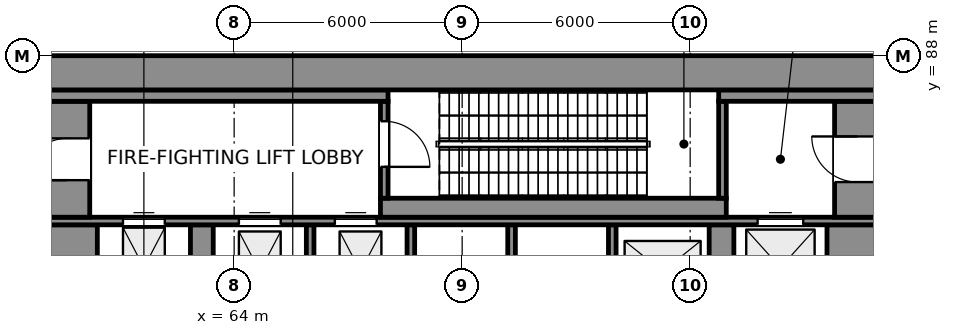
"""IFC4 building model, lengths in metres.
Left out: names, types, materials, properties, quantities, classifications, styles, units other than length and angle.
Written with IfcOpenShell. Run it as: python <this file> out.ifc"""

import sys

from ifc_helpers import new_model, si_unit, direction, frame, frame_2d, origin, place, context, subcontext, project, spatial, rectangle, extrude, element, fill, save


model = new_model("IFC4")
c1 = context("Model", 3, precision=1e-05, world=origin(), true_north=direction((0.0, 1.0)))
c2 = subcontext(c1, "Body", "Model", "MODEL_VIEW")
j1 = project(units=[si_unit("LENGTHUNIT", "METRE"), si_unit("PLANEANGLEUNIT", "RADIAN")], contexts=[c1])
p1 = place(None, origin())
s1 = spatial("IfcSite", under=j1, at=p1, CompositionType="ELEMENT")
p2 = place(p1, origin())
s2 = spatial("IfcBuilding", under=s1, at=p2, CompositionType="ELEMENT")
p3 = place(p2, frame((0.0, 0.0, 15.0)))
s3 = spatial("IfcBuildingStorey", under=s2, at=p3, CompositionType="ELEMENT", Elevation=15.0)
for number, where, z_axis, x_axis in (
    (1, (66.0, 81.1, 0.0), (0.0, 0.0, 1.0), (0.0, 1.0, 0.0)),
    (2, (68.65, 81.1, 0.0), (0.0, 0.0, 1.0), (0.0, 1.0, 0.0)),
    (3, (71.3, 81.1, 0.0), (0.0, 0.0, 1.0), (0.0, 1.0, 0.0)),
    (4, (73.95, 81.1, 0.0), (0.0, 0.0, 1.0), (0.0, 1.0, 0.0)),
):
    element("IfcWall", number, at=place(p3, frame(where, z_axis=z_axis, x_axis=x_axis)), inside=s3, PredefinedType="SHEAR", context=c2, shape_type="SweptSolid", body=[
        extrude(rectangle(XDim=2.45, YDim=0.2, at=frame_2d((1.225, 0.0))), origin(), (0.0, 0.0, 1.0), 8.0),
    ])
p4 = place(p3, frame((59.7, 81.3, 0.0), z_axis=(0.0, 0.0, 1.0), x_axis=(0.0, 1.0, 0.0)))
e5 = element("IfcWall", 5, at=p4, inside=s3, PredefinedType="SHEAR", context=c2, shape_type="SweptSolid", body=[
    extrude(rectangle(XDim=2.25, YDim=1.4, at=frame_2d((1.125, 0.0))), origin(), (0.0, 0.0, 1.0), 8.0),
])
p5 = place(p3, frame((63.15, 81.3, 0.0), z_axis=(0.0, 0.0, 1.0), x_axis=(0.0, 1.0, 0.0)))
e6 = element("IfcWall", 6, at=p5, inside=s3, PredefinedType="SHEAR", context=c2, shape_type="SweptSolid", body=[
    extrude(rectangle(XDim=2.25, YDim=0.6, at=frame_2d((1.125, 0.0))), origin(), (0.0, 0.0, 1.0), 8.0),
])
p6 = place(p3, frame((76.825, 81.3, 0.0), z_axis=(0.0, 0.0, 1.0), x_axis=(0.0, 1.0, 0.0)))
e7 = element("IfcWall", 7, at=p6, inside=s3, PredefinedType="SHEAR", context=c2, shape_type="SweptSolid", body=[
    extrude(rectangle(XDim=2.25, YDim=0.65, at=frame_2d((1.125, 0.0))), origin(), (0.0, 0.0, 1.0), 8.0),
])
p7 = place(p3, frame((80.3, 81.3, 0.0), z_axis=(0.0, 0.0, 1.0), x_axis=(0.0, 1.0, 0.0)))
e8 = element("IfcWall", 8, at=p7, inside=s3, PredefinedType="SHEAR", context=c2, shape_type="SweptSolid", body=[
    extrude(rectangle(XDim=2.25, YDim=1.4, at=frame_2d((1.125, 0.0))), origin(), (0.0, 0.0, 1.0), 8.0),
])
p8 = place(p3, frame((59.0, 83.65, 0.0), z_axis=(0.0, 0.0, 1.0), x_axis=(1.0, 0.0, 0.0)))
e9 = element("IfcWall", 9, at=p8, inside=s3, PredefinedType="SHEAR", context=c2, shape_type="SweptSolid", body=[
    extrude(rectangle(XDim=22.0, YDim=0.2, at=frame_2d((11.0, 0.0))), origin(), (0.0, 0.0, 1.0), 8.0),
])
p9 = place(p8, frame((5.125, 0.0, 0.0)))
e10 = element("IfcOpeningElement", 10, at=p9, cuts=e9, PredefinedType="OPENING", context=c2, shape_type="SweptSolid", body=[
    extrude(rectangle(XDim=1.1, YDim=2.1, at=frame_2d((0.55, 1.05))), frame((0.0, 0.11, 0.0), z_axis=(0.0, -1.0, 0.0), x_axis=(1.0, 0.0, 0.0)), (0.0, 0.0, 1.0), 0.22),
])
p10 = place(p8, frame((7.65, 0.0, 0.0)))
e11 = element("IfcOpeningElement", 11, at=p10, cuts=e9, PredefinedType="OPENING", context=c2, shape_type="SweptSolid", body=[
    extrude(rectangle(XDim=1.1, YDim=2.1, at=frame_2d((0.55, 1.05))), frame((0.0, 0.11, 0.0), z_axis=(0.0, -1.0, 0.0), x_axis=(1.0, 0.0, 0.0)), (0.0, 0.0, 1.0), 0.22),
])
p11 = place(p8, frame((18.775, 0.0, 0.0)))
e12 = element("IfcOpeningElement", 12, at=p11, cuts=e9, PredefinedType="OPENING", context=c2, shape_type="SweptSolid", body=[
    extrude(rectangle(XDim=1.2, YDim=2.1, at=frame_2d((0.6, 1.05))), frame((0.0, 0.11, 0.0), z_axis=(0.0, -1.0, 0.0), x_axis=(1.0, 0.0, 0.0)), (0.0, 0.0, 1.0), 0.22),
])
p12 = place(p8, frame((2.075, 0.0, 0.0)))
e13 = element("IfcOpeningElement", 13, at=p12, cuts=e9, PredefinedType="OPENING", context=c2, shape_type="SweptSolid", body=[
    extrude(rectangle(XDim=1.1, YDim=2.1, at=frame_2d((0.55, 1.05))), frame((0.0, 0.11, 0.0), z_axis=(0.0, -1.0, 0.0), x_axis=(1.0, 0.0, 0.0)), (0.0, 0.0, 1.0), 0.22),
])
p13 = place(p3, frame((59.6, 83.75, 0.0), z_axis=(0.0, 0.0, 1.0), x_axis=(0.0, 1.0, 0.0)))
e14 = element("IfcWall", 14, at=p13, inside=s3, PredefinedType="SHEAR", context=c2, shape_type="SweptSolid", body=[
    extrude(rectangle(XDim=3.05, YDim=1.2, at=frame_2d((1.525, 0.0))), origin(), (0.0, 0.0, 1.0), 8.0),
])
p14 = place(p13, frame((0.975, 0.0, 0.0)))
e15 = element("IfcOpeningElement", 15, at=p14, cuts=e14, PredefinedType="OPENING", context=c2, shape_type="SweptSolid", body=[
    extrude(rectangle(XDim=1.1, YDim=2.1, at=frame_2d((0.55, 1.05))), frame((0.0, 0.61, 0.0), z_axis=(0.0, -1.0, 0.0), x_axis=(1.0, 0.0, 0.0)), (0.0, 0.0, 1.0), 1.22),
])
p15 = place(p3, frame((67.85, 84.0, 0.0), z_axis=(0.0, 0.0, 1.0), x_axis=(1.0, 0.0, 0.0)))
e16 = element("IfcWall", 16, at=p15, inside=s3, PredefinedType="SHEAR", context=c2, shape_type="SweptSolid", body=[
    extrude(rectangle(XDim=9.1, YDim=0.5, at=frame_2d((4.55, 0.0))), origin(), (0.0, 0.0, 1.0), 8.0),
])
p16 = place(p3, frame((80.4, 83.75, 0.0), z_axis=(0.0, 0.0, 1.0), x_axis=(0.0, 1.0, 0.0)))
e17 = element("IfcWall", 17, at=p16, inside=s3, PredefinedType="SHEAR", context=c2, shape_type="SweptSolid", body=[
    extrude(rectangle(XDim=3.05, YDim=1.2, at=frame_2d((1.525, 0.0))), origin(), (0.0, 0.0, 1.0), 8.0),
])
p17 = place(p16, frame((0.925, 0.0, 0.0)))
e18 = element("IfcOpeningElement", 18, at=p17, cuts=e17, PredefinedType="OPENING", context=c2, shape_type="SweptSolid", body=[
    extrude(rectangle(XDim=1.2, YDim=2.1, at=frame_2d((0.6, 1.05))), frame((0.0, 0.61, 0.0), z_axis=(0.0, -1.0, 0.0), x_axis=(1.0, 0.0, 0.0)), (0.0, 0.0, 1.0), 1.22),
])
p18 = place(p3, frame((67.95, 84.25, 0.0), z_axis=(0.0, 0.0, 1.0), x_axis=(0.0, 1.0, 0.0)))
e19 = element("IfcWall", 19, at=p18, inside=s3, PredefinedType="SHEAR", context=c2, shape_type="SweptSolid", body=[
    extrude(rectangle(XDim=2.55, YDim=0.2, at=frame_2d((1.275, 0.0))), origin(), (0.0, 0.0, 1.0), 8.0),
])
p19 = place(p18, frame((0.825, 0.0, 0.0)))
e20 = element("IfcOpeningElement", 20, at=p19, cuts=e19, PredefinedType="OPENING", context=c2, shape_type="SweptSolid", body=[
    extrude(rectangle(XDim=1.2, YDim=2.1, at=frame_2d((0.6, 1.05))), frame((0.0, 0.11, 0.0), z_axis=(0.0, -1.0, 0.0), x_axis=(1.0, 0.0, 0.0)), (0.0, 0.0, 1.0), 0.22),
])
p20 = place(p3, frame((76.85, 84.25, 0.0), z_axis=(0.0, 0.0, 1.0), x_axis=(0.0, 1.0, 0.0)))
e21 = element("IfcWall", 21, at=p20, inside=s3, PredefinedType="SHEAR", context=c2, shape_type="SweptSolid", body=[
    extrude(rectangle(XDim=2.55, YDim=0.2, at=frame_2d((1.275, 0.0))), origin(), (0.0, 0.0, 1.0), 8.0),
])
p21 = place(p3, frame((59.0, 86.95, 0.0), z_axis=(0.0, 0.0, 1.0), x_axis=(1.0, 0.0, 0.0)))
e22 = element("IfcWall", 22, at=p21, inside=s3, PredefinedType="SHEAR", context=c2, shape_type="SweptSolid", body=[
    extrude(rectangle(XDim=9.05, YDim=0.3, at=frame_2d((4.525, 0.0))), origin(), (0.0, 0.0, 1.0), 8.0),
])
p22 = place(p3, frame((76.75, 86.95, 0.0), z_axis=(0.0, 0.0, 1.0), x_axis=(1.0, 0.0, 0.0)))
e23 = element("IfcWall", 23, at=p22, inside=s3, PredefinedType="SHEAR", context=c2, shape_type="SweptSolid", body=[
    extrude(rectangle(XDim=4.25, YDim=0.3, at=frame_2d((2.125, 0.0))), origin(), (0.0, 0.0, 1.0), 8.0),
])
p23 = place(p3, frame((59.0, 87.55, 0.0), z_axis=(0.0, 0.0, 1.0), x_axis=(1.0, 0.0, 0.0)))
e24 = element("IfcWall", 24, at=p23, inside=s3, PredefinedType="SHEAR", context=c2, shape_type="SweptSolid", body=[
    extrude(rectangle(XDim=22.0, YDim=0.9, at=frame_2d((11.0, 0.0))), origin(), (0.0, 0.0, 1.0), 8.0),
])
p24 = place(p19, frame((1.2, 0.0, 0.0), z_axis=(0.0, 0.0, 1.0), x_axis=(-1.0, 0.0, 0.0)))
e25 = element("IfcDoor", 25, at=p24, inside=s3, OperationType="SINGLE_SWING_RIGHT", PredefinedType="DOOR", context=c2, shape_type="SweptSolid", body=[
    extrude(rectangle(XDim=1.2, YDim=2.1, at=frame_2d((0.6, 1.05))), frame((0.0, 0.025, 0.0), z_axis=(0.0, -1.0, 0.0), x_axis=(1.0, 0.0, 0.0)), (0.0, 0.0, 1.0), 0.05),
])
fill(e20, e25)
p25 = place(p14, origin())
e26 = element("IfcDoor", 26, at=p25, inside=s3, OperationType="SINGLE_SWING_LEFT", PredefinedType="DOOR", context=c2, shape_type="SweptSolid", body=[
    extrude(rectangle(XDim=1.1, YDim=2.1, at=frame_2d((0.55, 1.05))), frame((0.0, 0.025, 0.0), z_axis=(0.0, -1.0, 0.0), x_axis=(1.0, 0.0, 0.0)), (0.0, 0.0, 1.0), 0.05),
])
fill(e15, e26)
p26 = place(p17, origin())
e27 = element("IfcDoor", 27, at=p26, inside=s3, OperationType="SINGLE_SWING_RIGHT", PredefinedType="DOOR", context=c2, shape_type="SweptSolid", body=[
    extrude(rectangle(XDim=1.2, YDim=2.1, at=frame_2d((0.6, 1.05))), frame((0.0, 0.025, 0.0), z_axis=(0.0, -1.0, 0.0), x_axis=(1.0, 0.0, 0.0)), (0.0, 0.0, 1.0), 0.05),
])
fill(e18, e27)
p27 = place(p9, origin())
e28 = element("IfcDoor", 28, at=p27, inside=s3, OperationType="DOUBLE_DOOR_SLIDING", PredefinedType="DOOR", context=c2, shape_type="SweptSolid", body=[
    extrude(rectangle(XDim=1.1, YDim=2.1, at=frame_2d((0.55, 1.05))), frame((0.0, 0.025, 0.0), z_axis=(0.0, -1.0, 0.0), x_axis=(1.0, 0.0, 0.0)), (0.0, 0.0, 1.0), 0.05),
])
fill(e10, e28)
p28 = place(p10, origin())
e29 = element("IfcDoor", 29, at=p28, inside=s3, OperationType="DOUBLE_DOOR_SLIDING", PredefinedType="DOOR", context=c2, shape_type="SweptSolid", body=[
    extrude(rectangle(XDim=1.1, YDim=2.1, at=frame_2d((0.55, 1.05))), frame((0.0, 0.025, 0.0), z_axis=(0.0, -1.0, 0.0), x_axis=(1.0, 0.0, 0.0)), (0.0, 0.0, 1.0), 0.05),
])
fill(e11, e29)
p29 = place(p11, origin())
e30 = element("IfcDoor", 30, at=p29, inside=s3, OperationType="DOUBLE_DOOR_SLIDING", PredefinedType="DOOR", context=c2, shape_type="SweptSolid", body=[
    extrude(rectangle(XDim=1.2, YDim=2.1, at=frame_2d((0.6, 1.05))), frame((0.0, 0.025, 0.0), z_axis=(0.0, -1.0, 0.0), x_axis=(1.0, 0.0, 0.0)), (0.0, 0.0, 1.0), 0.05),
])
fill(e12, e30)
p30 = place(p12, origin())
e31 = element("IfcDoor", 31, at=p30, inside=s3, OperationType="DOUBLE_DOOR_SLIDING", PredefinedType="DOOR", context=c2, shape_type="SweptSolid", body=[
    extrude(rectangle(XDim=1.1, YDim=2.1, at=frame_2d((0.55, 1.05))), frame((0.0, 0.025, 0.0), z_axis=(0.0, -1.0, 0.0), x_axis=(1.0, 0.0, 0.0)), (0.0, 0.0, 1.0), 0.05),
])
fill(e13, e31)
save(model, sys.argv[1])
